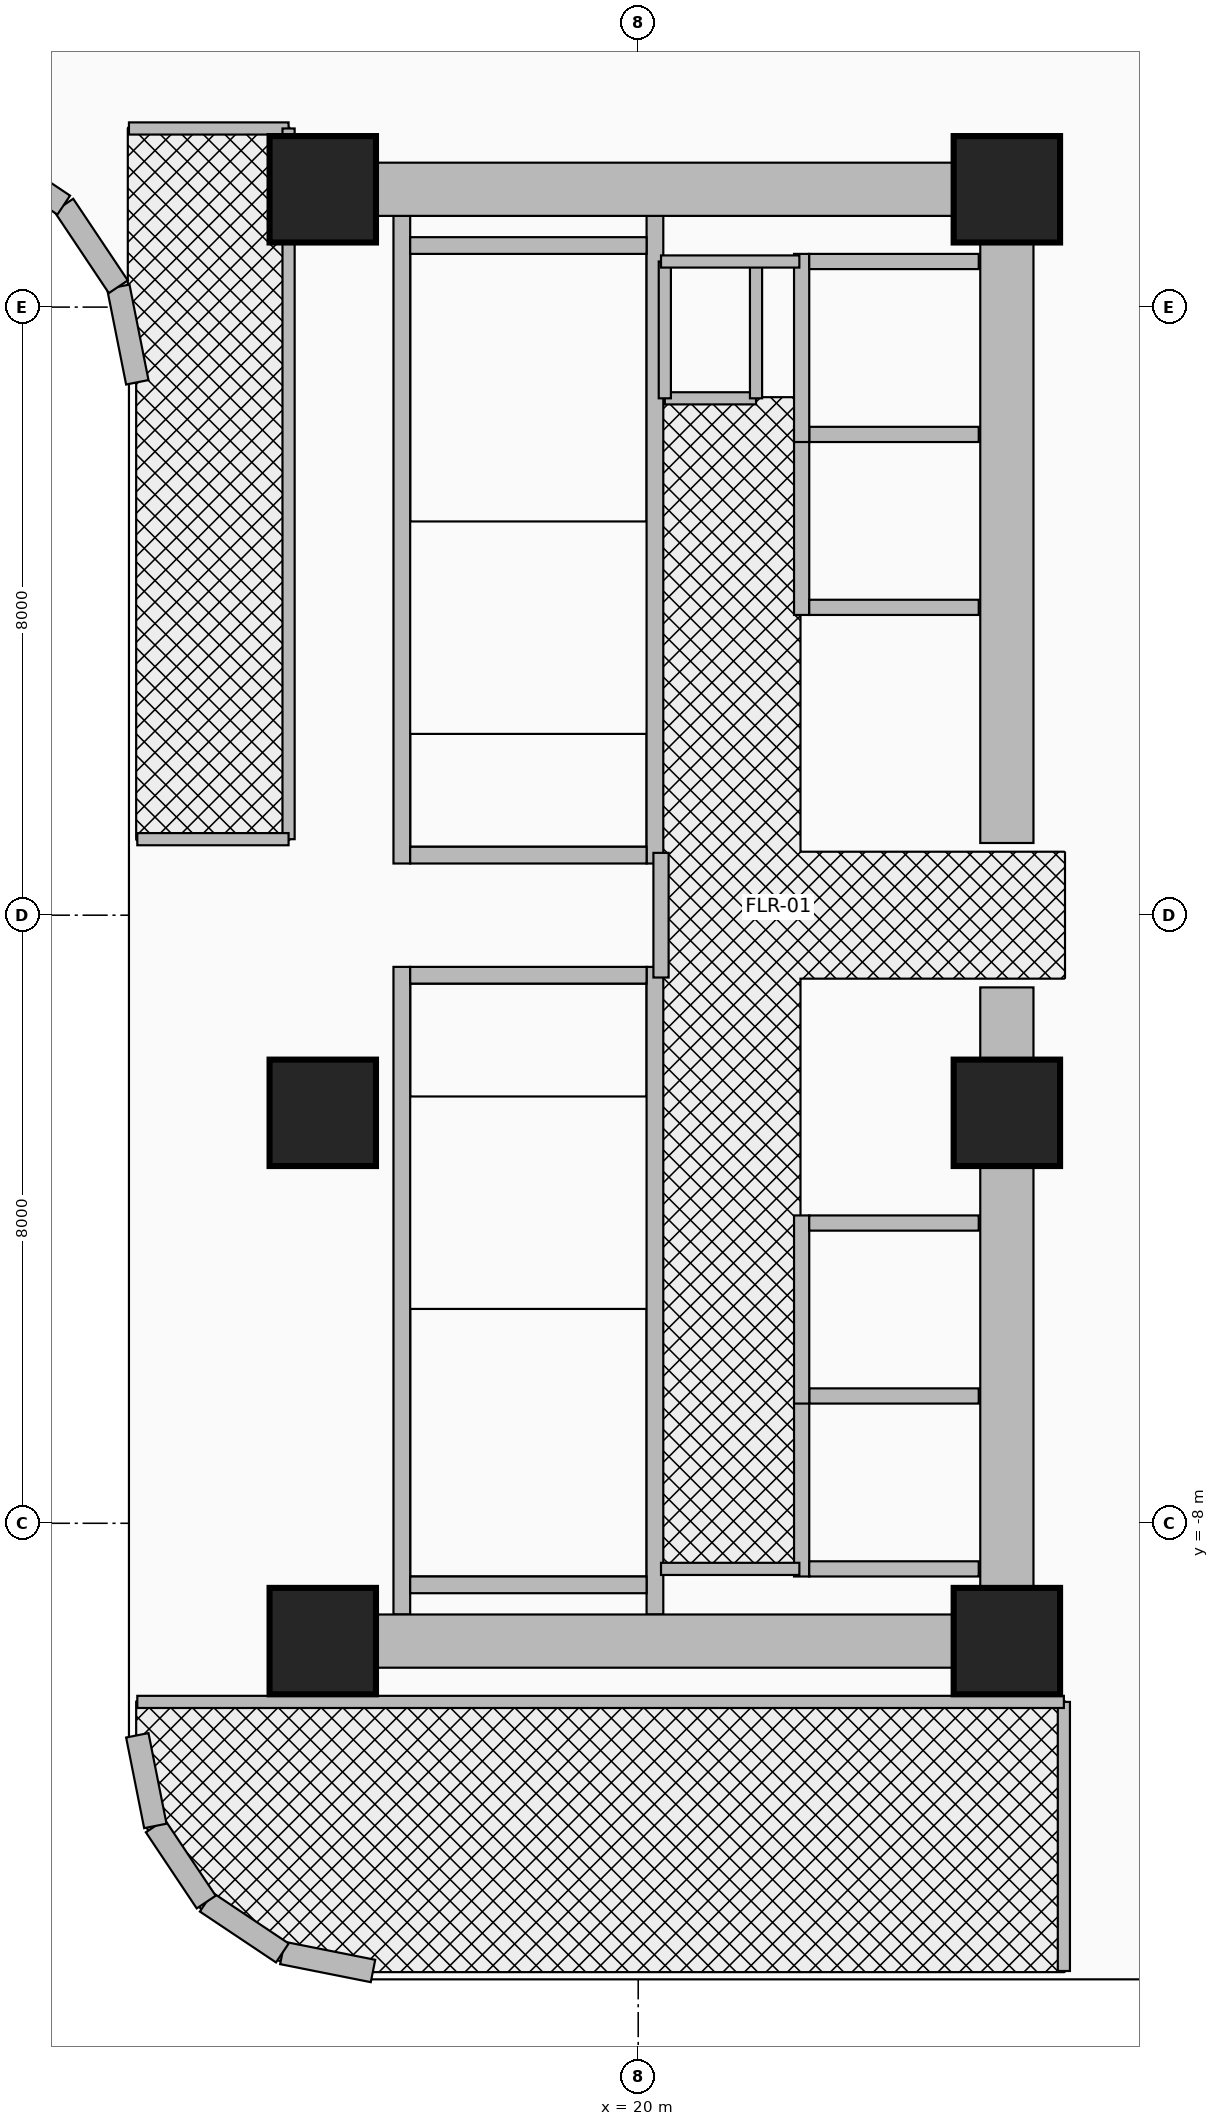
"""IFC4 building model, lengths in metres.
Left out: names, types, materials, properties, quantities, classifications, styles, units other than length and angle.
Written with IfcOpenShell. Run it as: python <this file> out.ifc"""

import sys

from ifc_helpers import new_model, si_unit, direction, frame, frame_2d, origin, origin_2d, place, context, subcontext, project, spatial, rectangle, extrude, source, transform, mapped, element, fill, save


model = new_model("IFC4")
c1 = context("Model", 3, precision=1e-05, world=origin(), true_north=direction((0.0, 1.0)))
c2 = subcontext(c1, "Body", "Model", "MODEL_VIEW")
j1 = project(units=[si_unit("LENGTHUNIT", "METRE"), si_unit("PLANEANGLEUNIT", "RADIAN")], contexts=[c1])
p1 = place(None, origin())
s1 = spatial("IfcSite", under=j1, at=p1, CompositionType="ELEMENT")
p2 = place(p1, origin())
s2 = spatial("IfcBuilding", under=s1, at=p2, CompositionType="ELEMENT")
p3 = place(p2, frame((0.0, 0.0, 48.2)))
s3 = spatial("IfcBuildingStorey", under=s2, at=p3, CompositionType="ELEMENT", Elevation=48.2)
for number, where, z_axis, x_axis in (
    (1, (16.89, 0.68, 0.0), (0.0, 0.0, 1.0), (0.0, 1.0, 0.0)),
    (2, (20.22, 0.68, 0.0), (0.0, 0.0, 1.0), (0.0, 1.0, 0.0)),
):
    element("IfcWall", number, at=place(p3, frame(where, z_axis=z_axis, x_axis=x_axis)), inside=s3, PredefinedType="SHEAR", context=c2, shape_type="SweptSolid", body=[
        extrude(rectangle(XDim=8.52, YDim=0.22, at=frame_2d((4.26, 0.0))), origin(), (0.0, 0.0, 1.0), 3.46),
    ])
p4 = place(p3, frame((17.0, 0.79, 0.0), z_axis=(0.0, 0.0, 1.0), x_axis=(1.0, 0.0, 0.0)))
e3 = element("IfcWall", 3, at=p4, inside=s3, PredefinedType="SHEAR", context=c2, shape_type="SweptSolid", body=[
    extrude(rectangle(XDim=3.11, YDim=0.22, at=frame_2d((1.555, 0.0))), origin(), (0.0, 0.0, 1.0), 3.46),
])
p5 = place(p4, frame((0.95, 0.0, 0.0)))
e4 = element("IfcOpeningElement", 4, at=p5, cuts=e3, PredefinedType="OPENING", context=c2, shape_type="SweptSolid", body=[
    extrude(rectangle(XDim=1.1, YDim=2.15, at=frame_2d((0.55, 1.075))), frame((0.0, 0.125, 0.0), z_axis=(0.0, -1.0, 0.0), x_axis=(1.0, 0.0, 0.0)), (0.0, 0.0, 1.0), 0.25),
])
p6 = place(p3, frame((17.0, 8.81, 0.0), z_axis=(0.0, 0.0, 1.0), x_axis=(1.0, 0.0, 0.0)))
e5 = element("IfcWall", 5, at=p6, inside=s3, PredefinedType="SHEAR", context=c2, shape_type="SweptSolid", body=[
    extrude(rectangle(XDim=3.11, YDim=0.22, at=frame_2d((1.555, 0.0))), origin(), (0.0, 0.0, 1.0), 3.46),
])
for number, where, z_axis, x_axis in (
    (6, (16.89, -9.2, 0.0), (0.0, 0.0, 1.0), (0.0, 1.0, 0.0)),
    (7, (20.22, -9.2, 0.0), (0.0, 0.0, 1.0), (0.0, 1.0, 0.0)),
):
    element("IfcWall", number, at=place(p3, frame(where, z_axis=z_axis, x_axis=x_axis)), inside=s3, PredefinedType="SHEAR", context=c2, shape_type="SweptSolid", body=[
        extrude(rectangle(XDim=8.52, YDim=0.22, at=frame_2d((4.26, 0.0))), origin(), (0.0, 0.0, 1.0), 3.46),
    ])
p7 = place(p3, frame((17.0, -8.81, 0.0), z_axis=(0.0, 0.0, 1.0), x_axis=(1.0, 0.0, 0.0)))
e8 = element("IfcWall", 8, at=p7, inside=s3, PredefinedType="SHEAR", context=c2, shape_type="SweptSolid", body=[
    extrude(rectangle(XDim=3.11, YDim=0.22, at=frame_2d((1.555, 0.0))), origin(), (0.0, 0.0, 1.0), 3.46),
])
p8 = place(p3, frame((17.0, -0.79, 0.0), z_axis=(0.0, 0.0, 1.0), x_axis=(1.0, 0.0, 0.0)))
e9 = element("IfcWall", 9, at=p8, inside=s3, PredefinedType="SHEAR", context=c2, shape_type="SweptSolid", body=[
    extrude(rectangle(XDim=3.11, YDim=0.22, at=frame_2d((1.555, 0.0))), origin(), (0.0, 0.0, 1.0), 3.46),
])
p9 = place(p8, frame((0.95, 0.0, 0.0)))
e10 = element("IfcOpeningElement", 10, at=p9, cuts=e9, PredefinedType="OPENING", context=c2, shape_type="SweptSolid", body=[
    extrude(rectangle(XDim=1.1, YDim=2.15, at=frame_2d((0.55, 1.075))), frame((0.0, 0.125, 0.0), z_axis=(0.0, -1.0, 0.0), x_axis=(1.0, 0.0, 0.0)), (0.0, 0.0, 1.0), 0.25),
])
for number, where, z_axis, x_axis in (
    (11, (24.85, -9.9, 0.0), (0.0, 0.0, 1.0), (0.0, 1.0, 0.0)),
    (12, (24.85, 0.95, 0.0), (0.0, 0.0, 1.0), (0.0, 1.0, 0.0)),
):
    element("IfcWall", number, at=place(p3, frame(where, z_axis=z_axis, x_axis=x_axis)), inside=s3, PredefinedType="SHEAR", context=c2, shape_type="SweptSolid", body=[
        extrude(rectangle(XDim=8.95, YDim=0.7, at=frame_2d((4.475, 0.0))), origin(), (0.0, 0.0, 1.0), 3.46),
    ])
for number, where, z_axis, x_axis in (
    (13, (15.85, 9.55, 0.0), (0.0, 0.0, 1.0), (1.0, 0.0, 0.0)),
    (14, (15.85, -9.55, 0.0), (0.0, 0.0, 1.0), (1.0, 0.0, 0.0)),
):
    element("IfcWall", number, at=place(p3, frame(where, z_axis=z_axis, x_axis=x_axis)), inside=s3, PredefinedType="SHEAR", context=c2, shape_type="SweptSolid", body=[
        extrude(rectangle(XDim=9.0, YDim=0.7, at=frame_2d((4.5, 0.0))), origin(), (0.0, 0.0, 1.0), 3.46),
    ])
m1 = source(origin(), c2, "Body", "SweptSolid", [
    extrude(rectangle(XDim=1.4, YDim=1.4, at=origin_2d()), origin(), (0.0, 0.0, 1.0), 3.7),
])
for number, where, z_axis, x_axis in (
    (15, (15.85, -9.55, 0.0), (0.0, 0.0, 1.0), (1.0, 0.0, 0.0)),
    (16, (24.85, -9.55, 0.0), (0.0, 0.0, 1.0), (1.0, 0.0, 0.0)),
    (17, (15.85, -2.6, 0.0), (0.0, 0.0, 1.0), (1.0, 0.0, 0.0)),
    (18, (24.85, -2.6, 0.0), (0.0, 0.0, 1.0), (1.0, 0.0, 0.0)),
    (19, (15.85, 9.55, 0.0), (0.0, 0.0, 1.0), (1.0, 0.0, 0.0)),
    (20, (24.85, 9.55, 0.0), (0.0, 0.0, 1.0), (1.0, 0.0, 0.0)),
):
    element("IfcColumn", number, at=place(p3, frame(where, z_axis=z_axis, x_axis=x_axis)), inside=s3, PredefinedType="COLUMN", context=c2, shape_type="MappedRepresentation", body=[
        mapped(m1, transform((0.0, 0.0, 0.0), x_axis=(1.0, 0.0, 0.0), y_axis=(0.0, 1.0, 0.0), z_axis=(0.0, 0.0, 1.0), scale=1.0)),
    ])
p10 = place(p3, frame((16.511, -13.89, 0.0), z_axis=(0.0, 0.0, 1.0), x_axis=(-0.980804027463, 0.194996050505, 0.0)))
e21 = element("IfcWall", 21, at=p10, inside=s3, PredefinedType="SOLIDWALL", context=c2, shape_type="SweptSolid", body=[
    extrude(rectangle(XDim=1.216, YDim=0.3, at=frame_2d((0.608, 0.0))), origin(), (0.0, 0.0, 1.0), 3.46),
])
for number, where, z_axis, x_axis in (
    (22, (15.318, -13.653, 0.0), (0.0, 0.0, 1.0), (-0.831, 0.556, 0.0)),
    (23, (14.317, -12.983, 0.0), (0.0, 0.0, 1.0), (-0.556, 0.831, 0.0)),
):
    element("IfcWall", number, at=place(p3, frame(where, z_axis=z_axis, x_axis=x_axis)), inside=s3, PredefinedType="SOLIDWALL", context=c2, shape_type="SweptSolid", body=[
        extrude(rectangle(XDim=1.205, YDim=0.3, at=frame_2d((0.603, 0.0))), origin(), (0.0, 0.0, 1.0), 3.46),
    ])
p11 = place(p3, frame((13.647, -11.982, 0.0), z_axis=(0.0, 0.0, 1.0), x_axis=(-0.195189223115, 0.980765602568, 0.0)))
e24 = element("IfcWall", 24, at=p11, inside=s3, PredefinedType="SOLIDWALL", context=c2, shape_type="SweptSolid", body=[
    extrude(rectangle(XDim=1.216, YDim=0.3, at=frame_2d((0.608, 0.0))), origin(), (0.0, 0.0, 1.0), 3.46),
])
p12 = place(p3, frame((13.41, 7.011, 0.0), z_axis=(0.0, 0.0, 1.0), x_axis=(-0.195090163074, 0.980785312019, 0.0)))
e25 = element("IfcWall", 25, at=p12, inside=s3, PredefinedType="SOLIDWALL", context=c2, shape_type="SweptSolid", body=[
    extrude(rectangle(XDim=1.281, YDim=0.3, at=frame_2d((0.641, 0.0))), origin(), (0.0, 0.0, 1.0), 3.46),
])
for number, where, z_axis, x_axis in (
    (26, (13.16, 8.268, 0.0), (0.0, 0.0, 1.0), (-0.556, 0.831, 0.0)),
    (27, (12.442, 9.342, 0.0), (0.0, 0.0, 1.0), (-0.831, 0.556, 0.0)),
):
    element("IfcWall", number, at=place(p3, frame(where, z_axis=z_axis, x_axis=x_axis)), inside=s3, PredefinedType="SOLIDWALL", context=c2, shape_type="SweptSolid", body=[
        extrude(rectangle(XDim=1.292, YDim=0.3, at=frame_2d((0.646, 0.0))), origin(), (0.0, 0.0, 1.0), 3.46),
    ])
p13 = place(p3, frame((22.15, -8.7, 0.0), z_axis=(0.0, 0.0, 1.0), x_axis=(0.0, 1.0, 0.0)))
e28 = element("IfcWall", 28, at=p13, inside=s3, PredefinedType="MOVABLE", context=c2, shape_type="SweptSolid", body=[
    extrude(rectangle(XDim=2.475, YDim=0.2, at=frame_2d((1.237, 0.0))), origin(), (0.0, 0.0, 1.0), 3.46),
])
p14 = place(p13, frame((0.688, 0.0, 0.0)))
e29 = element("IfcOpeningElement", 29, at=p14, cuts=e28, PredefinedType="OPENING", context=c2, shape_type="SweptSolid", body=[
    extrude(rectangle(XDim=1.1, YDim=2.1, at=frame_2d((0.55, 1.05))), frame((0.0, 0.115, 0.0), z_axis=(0.0, -1.0, 0.0), x_axis=(1.0, 0.0, 0.0)), (0.0, 0.0, 1.0), 0.23),
])
for number, where, z_axis, x_axis in (
    (30, (22.25, -8.6, 0.0), (0.0, 0.0, 1.0), (1.0, 0.0, 0.0)),
    (31, (22.25, -6.325, 0.0), (0.0, 0.0, 1.0), (1.0, 0.0, 0.0)),
):
    element("IfcWall", number, at=place(p3, frame(where, z_axis=z_axis, x_axis=x_axis)), inside=s3, PredefinedType="MOVABLE", context=c2, shape_type="SweptSolid", body=[
        extrude(rectangle(XDim=2.23, YDim=0.2, at=frame_2d((1.115, 0.0))), origin(), (0.0, 0.0, 1.0), 3.46),
    ])
p15 = place(p3, frame((22.15, -6.425, 0.0), z_axis=(0.0, 0.0, 1.0), x_axis=(0.0, 1.0, 0.0)))
e32 = element("IfcWall", 32, at=p15, inside=s3, PredefinedType="MOVABLE", context=c2, shape_type="SweptSolid", body=[
    extrude(rectangle(XDim=2.475, YDim=0.2, at=frame_2d((1.238, 0.0))), origin(), (0.0, 0.0, 1.0), 3.46),
])
p16 = place(p15, frame((0.688, 0.0, 0.0)))
e33 = element("IfcOpeningElement", 33, at=p16, cuts=e32, PredefinedType="OPENING", context=c2, shape_type="SweptSolid", body=[
    extrude(rectangle(XDim=1.1, YDim=2.1, at=frame_2d((0.55, 1.05))), frame((0.0, 0.115, 0.0), z_axis=(0.0, -1.0, 0.0), x_axis=(1.0, 0.0, 0.0)), (0.0, 0.0, 1.0), 0.23),
])
p17 = place(p3, frame((22.25, -4.05, 0.0), z_axis=(0.0, 0.0, 1.0), x_axis=(1.0, 0.0, 0.0)))
e34 = element("IfcWall", 34, at=p17, inside=s3, PredefinedType="MOVABLE", context=c2, shape_type="SweptSolid", body=[
    extrude(rectangle(XDim=2.23, YDim=0.2, at=frame_2d((1.115, 0.0))), origin(), (0.0, 0.0, 1.0), 3.46),
])
p18 = place(p3, frame((22.15, 3.95, 0.0), z_axis=(0.0, 0.0, 1.0), x_axis=(0.0, 1.0, 0.0)))
e35 = element("IfcWall", 35, at=p18, inside=s3, PredefinedType="MOVABLE", context=c2, shape_type="SweptSolid", body=[
    extrude(rectangle(XDim=2.475, YDim=0.2, at=frame_2d((1.238, 0.0))), origin(), (0.0, 0.0, 1.0), 3.46),
])
for number, where, z_axis, x_axis in (
    (36, (22.25, 4.05, 0.0), (0.0, 0.0, 1.0), (1.0, 0.0, 0.0)),
    (37, (22.25, 6.325, 0.0), (0.0, 0.0, 1.0), (1.0, 0.0, 0.0)),
):
    element("IfcWall", number, at=place(p3, frame(where, z_axis=z_axis, x_axis=x_axis)), inside=s3, PredefinedType="MOVABLE", context=c2, shape_type="SweptSolid", body=[
        extrude(rectangle(XDim=2.23, YDim=0.2, at=frame_2d((1.115, 0.0))), origin(), (0.0, 0.0, 1.0), 2.245),
    ])
p19 = place(p3, frame((22.15, 6.225, 0.0), z_axis=(0.0, 0.0, 1.0), x_axis=(0.0, 1.0, 0.0)))
e38 = element("IfcWall", 38, at=p19, inside=s3, PredefinedType="MOVABLE", context=c2, shape_type="SweptSolid", body=[
    extrude(rectangle(XDim=2.475, YDim=0.2, at=frame_2d((1.237, 0.0))), origin(), (0.0, 0.0, 1.0), 3.46),
])
p20 = place(p3, frame((22.25, 8.6, 0.0), z_axis=(0.0, 0.0, 1.0), x_axis=(1.0, 0.0, 0.0)))
e39 = element("IfcWall", 39, at=p20, inside=s3, PredefinedType="MOVABLE", context=c2, shape_type="SweptSolid", body=[
    extrude(rectangle(XDim=2.23, YDim=0.2, at=frame_2d((1.115, 0.0))), origin(), (0.0, 0.0, 1.0), 2.245),
])
p21 = place(p3, frame((20.3, -0.82, 0.0), z_axis=(0.0, 0.0, 1.0), x_axis=(0.0, 1.0, 0.0)))
e40 = element("IfcWall", 40, at=p21, inside=s3, PredefinedType="PARTITIONING", context=c2, shape_type="SweptSolid", body=[
    extrude(rectangle(XDim=1.64, YDim=0.2, at=frame_2d((0.82, 0.0))), origin(), (0.0, 0.0, 1.0), 3.46),
])
p22 = place(p21, frame((0.295, 0.0, 0.0)))
e41 = element("IfcOpeningElement", 41, at=p22, cuts=e40, PredefinedType="OPENING", context=c2, shape_type="SweptSolid", body=[
    extrude(rectangle(XDim=1.05, YDim=2.15, at=frame_2d((0.525, 1.075))), frame((0.0, 0.115, 0.0), z_axis=(0.0, -1.0, 0.0), x_axis=(1.0, 0.0, 0.0)), (0.0, 0.0, 1.0), 0.23),
])
p23 = place(p3, frame((20.35, 6.8, 0.0), z_axis=(0.0, 0.0, 1.0), x_axis=(1.0, 0.0, 0.0)))
e42 = element("IfcWall", 42, at=p23, inside=s3, PredefinedType="PARTITIONING", context=c2, shape_type="SweptSolid", body=[
    extrude(rectangle(XDim=1.2, YDim=0.16, at=frame_2d((0.6, 0.0))), origin(), (0.0, 0.0, 1.0), 3.46),
])
p24 = place(p23, frame((0.175, 0.0, 0.0)))
e43 = element("IfcOpeningElement", 43, at=p24, cuts=e42, PredefinedType="OPENING", context=c2, shape_type="SweptSolid", body=[
    extrude(rectangle(XDim=0.85, YDim=2.05, at=frame_2d((0.425, 1.025))), frame((0.0, 0.095, 0.0), z_axis=(0.0, -1.0, 0.0), x_axis=(1.0, 0.0, 0.0)), (0.0, 0.0, 1.0), 0.19),
])
for number, where, z_axis, x_axis in (
    (44, (21.55, 6.8, 0.0), (0.0, 0.0, 1.0), (0.0, 1.0, 0.0)),
    (45, (20.35, 6.8, 0.0), (0.0, 0.0, 1.0), (0.0, 1.0, 0.0)),
):
    element("IfcWall", number, at=place(p3, frame(where, z_axis=z_axis, x_axis=x_axis)), inside=s3, PredefinedType="PARTITIONING", context=c2, shape_type="SweptSolid", body=[
        extrude(rectangle(XDim=1.8, YDim=0.16, at=frame_2d((0.9, 0.0))), origin(), (0.0, 0.0, 1.0), 3.46),
    ])
for number, where, z_axis, x_axis in (
    (46, (20.3, -8.6, 0.0), (0.0, 0.0, 1.0), (1.0, 0.0, 0.0)),
    (47, (20.3, 8.6, 0.0), (0.0, 0.0, 1.0), (1.0, 0.0, 0.0)),
):
    element("IfcWall", number, at=place(p3, frame(where, z_axis=z_axis, x_axis=x_axis)), inside=s3, PredefinedType="PARTITIONING", context=c2, shape_type="SweptSolid", body=[
        extrude(rectangle(XDim=1.82, YDim=0.16, at=frame_2d((0.91, 0.0))), origin(), (0.0, 0.0, 1.0), 3.46),
    ])
p25 = place(p3, frame((25.6, -13.89, 0.0), z_axis=(0.0, 0.0, 1.0), x_axis=(0.0, 1.0, 0.0)))
e48 = element("IfcWall", 48, at=p25, inside=s3, PredefinedType="PARTITIONING", context=c2, shape_type="SweptSolid", body=[
    extrude(rectangle(XDim=3.54, YDim=0.16, at=frame_2d((1.77, 0.0))), origin(), (0.0, 0.0, 1.0), 3.46),
])
p26 = place(p25, frame((1.32, 0.0, 0.0)))
e49 = element("IfcOpeningElement", 49, at=p26, cuts=e48, PredefinedType="OPENING", context=c2, shape_type="SweptSolid", body=[
    extrude(rectangle(XDim=0.9, YDim=2.1, at=frame_2d((0.45, 1.05))), frame((0.0, 0.095, 0.0), z_axis=(0.0, -1.0, 0.0), x_axis=(1.0, 0.0, 0.0)), (0.0, 0.0, 1.0), 0.19),
])
p27 = place(p3, frame((13.41, -10.35, 0.0), z_axis=(0.0, 0.0, 1.0), x_axis=(1.0, 0.0, 0.0)))
e50 = element("IfcWall", 50, at=p27, inside=s3, PredefinedType="PARTITIONING", context=c2, shape_type="SweptSolid", body=[
    extrude(rectangle(XDim=12.19, YDim=0.16, at=frame_2d((6.095, 0.0))), origin(), (0.0, 0.0, 1.0), 3.46),
])
p28 = place(p3, frame((13.3, 10.35, 0.0), z_axis=(0.0, 0.0, 1.0), x_axis=(1.0, 0.0, 0.0)))
e51 = element("IfcWall", 51, at=p28, inside=s3, PredefinedType="PARTITIONING", context=c2, shape_type="SweptSolid", body=[
    extrude(rectangle(XDim=2.1, YDim=0.16, at=frame_2d((1.05, 0.0))), origin(), (0.0, 0.0, 1.0), 2.583),
])
p29 = place(p28, frame((0.45, 0.0, 0.0)))
e52 = element("IfcOpeningElement", 52, at=p29, cuts=e51, PredefinedType="OPENING", context=c2, shape_type="SweptSolid", body=[
    extrude(rectangle(XDim=0.9, YDim=2.1, at=frame_2d((0.45, 1.05))), frame((0.0, 0.095, 0.0), z_axis=(0.0, -1.0, 0.0), x_axis=(1.0, 0.0, 0.0)), (0.0, 0.0, 1.0), 0.19),
])
p30 = place(p3, frame((15.4, 1.0, 0.0), z_axis=(0.0, 0.0, 1.0), x_axis=(0.0, 1.0, 0.0)))
e53 = element("IfcWall", 53, at=p30, inside=s3, PredefinedType="PARTITIONING", context=c2, shape_type="SweptSolid", body=[
    extrude(rectangle(XDim=9.35, YDim=0.16, at=frame_2d((4.675, 0.0))), origin(), (0.0, 0.0, 1.0), 2.245),
])
p31 = place(p3, frame((13.41, 1.0, 0.0), z_axis=(0.0, 0.0, 1.0), x_axis=(1.0, 0.0, 0.0)))
e54 = element("IfcWall", 54, at=p31, inside=s3, PredefinedType="PARTITIONING", context=c2, shape_type="SweptSolid", body=[
    extrude(rectangle(XDim=1.99, YDim=0.16, at=frame_2d((0.995, 0.0))), origin(), (0.0, 0.0, 1.0), 2.245),
])
p32 = place(p14, origin())
e55 = element("IfcDoor", 55, at=p32, inside=s3, OperationType="DOUBLE_DOOR_SLIDING", PredefinedType="DOOR", context=c2, shape_type="SweptSolid", body=[
    extrude(rectangle(XDim=1.1, YDim=2.1, at=frame_2d((0.55, 1.05))), frame((0.0, 0.025, 0.0), z_axis=(0.0, -1.0, 0.0), x_axis=(1.0, 0.0, 0.0)), (0.0, 0.0, 1.0), 0.05),
])
fill(e29, e55)
p33 = place(p16, origin())
e56 = element("IfcDoor", 56, at=p33, inside=s3, OperationType="DOUBLE_DOOR_SLIDING", PredefinedType="DOOR", context=c2, shape_type="SweptSolid", body=[
    extrude(rectangle(XDim=1.1, YDim=2.1, at=frame_2d((0.55, 1.05))), frame((0.0, 0.025, 0.0), z_axis=(0.0, -1.0, 0.0), x_axis=(1.0, 0.0, 0.0)), (0.0, 0.0, 1.0), 0.05),
])
fill(e33, e56)
p34 = place(p22, frame((1.05, 0.0, 0.0), z_axis=(0.0, 0.0, 1.0), x_axis=(-1.0, 0.0, 0.0)))
e57 = element("IfcDoor", 57, at=p34, inside=s3, OperationType="SINGLE_SWING_LEFT", PredefinedType="DOOR", context=c2, shape_type="SweptSolid", body=[
    extrude(rectangle(XDim=1.05, YDim=2.15, at=frame_2d((0.525, 1.075))), frame((0.0, 0.025, 0.0), z_axis=(0.0, -1.0, 0.0), x_axis=(1.0, 0.0, 0.0)), (0.0, 0.0, 1.0), 0.05),
])
fill(e41, e57)
p35 = place(p5, origin())
e58 = element("IfcDoor", 58, at=p35, inside=s3, OperationType="SINGLE_SWING_RIGHT", PredefinedType="DOOR", context=c2, shape_type="SweptSolid", body=[
    extrude(rectangle(XDim=1.1, YDim=2.15, at=frame_2d((0.55, 1.075))), frame((0.0, 0.025, 0.0), z_axis=(0.0, -1.0, 0.0), x_axis=(1.0, 0.0, 0.0)), (0.0, 0.0, 1.0), 0.05),
])
fill(e4, e58)
p36 = place(p9, frame((1.1, 0.0, 0.0), z_axis=(0.0, 0.0, 1.0), x_axis=(-1.0, 0.0, 0.0)))
e59 = element("IfcDoor", 59, at=p36, inside=s3, OperationType="SINGLE_SWING_LEFT", PredefinedType="DOOR", context=c2, shape_type="SweptSolid", body=[
    extrude(rectangle(XDim=1.1, YDim=2.15, at=frame_2d((0.55, 1.075))), frame((0.0, 0.025, 0.0), z_axis=(0.0, -1.0, 0.0), x_axis=(1.0, 0.0, 0.0)), (0.0, 0.0, 1.0), 0.05),
])
fill(e10, e59)
p37 = place(p24, origin())
e60 = element("IfcDoor", 60, at=p37, inside=s3, OperationType="SINGLE_SWING_RIGHT", PredefinedType="DOOR", context=c2, shape_type="SweptSolid", body=[
    extrude(rectangle(XDim=0.85, YDim=2.05, at=frame_2d((0.425, 1.025))), frame((0.0, 0.025, 0.0), z_axis=(0.0, -1.0, 0.0), x_axis=(1.0, 0.0, 0.0)), (0.0, 0.0, 1.0), 0.05),
])
fill(e43, e60)
p38 = place(p26, origin())
e61 = element("IfcDoor", 61, at=p38, inside=s3, OperationType="SINGLE_SWING_RIGHT", PredefinedType="DOOR", context=c2, shape_type="SweptSolid", body=[
    extrude(rectangle(XDim=0.9, YDim=2.1, at=frame_2d((0.45, 1.05))), frame((0.0, 0.025, 0.0), z_axis=(0.0, -1.0, 0.0), x_axis=(1.0, 0.0, 0.0)), (0.0, 0.0, 1.0), 0.05),
])
fill(e49, e61)
p39 = place(p29, origin())
e62 = element("IfcDoor", 62, at=p39, inside=s3, OperationType="SINGLE_SWING_RIGHT", PredefinedType="DOOR", context=c2, shape_type="SweptSolid", body=[
    extrude(rectangle(XDim=0.9, YDim=2.1, at=frame_2d((0.45, 1.05))), frame((0.0, 0.025, 0.0), z_axis=(0.0, -1.0, 0.0), x_axis=(1.0, 0.0, 0.0)), (0.0, 0.0, 1.0), 0.05),
])
fill(e52, e62)
save(model, sys.argv[1])
